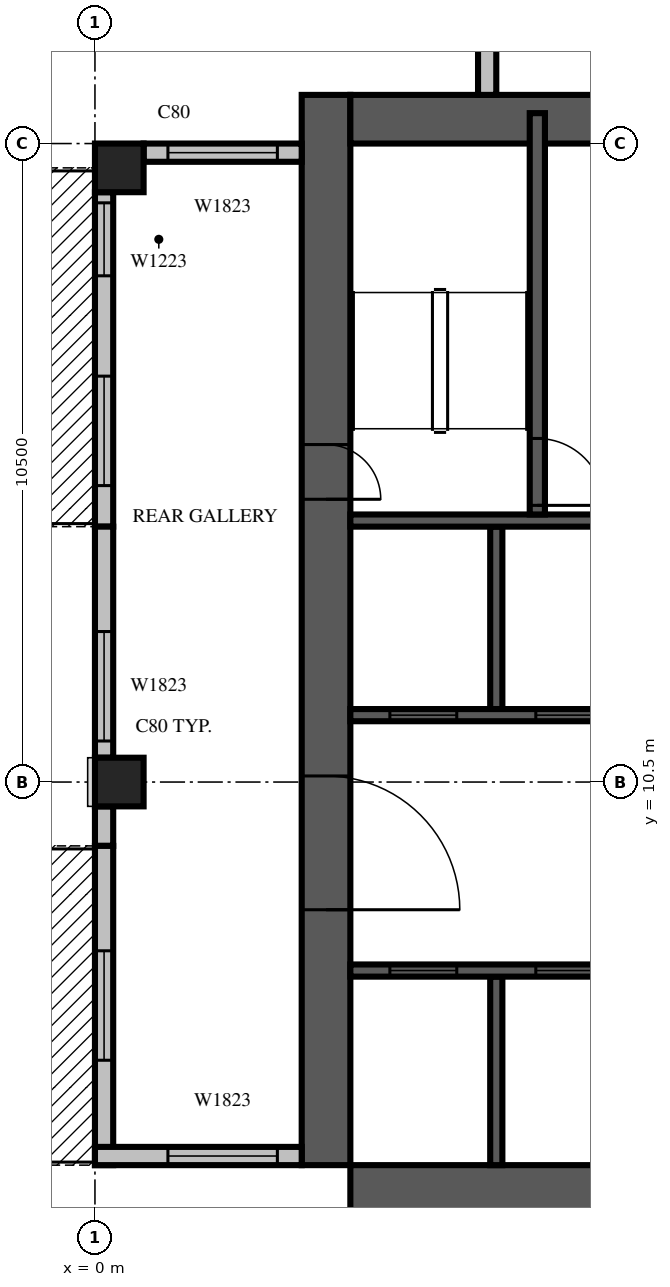
"""IFC4 building model, lengths in metres.
Left out: names, types, materials, properties, quantities, classifications, styles, units other than length and angle.
Written with IfcOpenShell. Run it as: python <this file> out.ifc"""

import sys

from ifc_helpers import new_model, si_unit, direction, frame, frame_2d, origin, origin_2d, place, context, subcontext, project, spatial, rectangle, extrude, source, transform, mapped, element, fill, save


model = new_model("IFC4")
c1 = context("Model", 3, precision=1e-05, world=origin(), true_north=direction((0.0, 1.0)))
c2 = subcontext(c1, "Body", "Model", "MODEL_VIEW")
j1 = project(units=[si_unit("LENGTHUNIT", "METRE"), si_unit("PLANEANGLEUNIT", "RADIAN")], contexts=[c1])
p1 = place(None, origin())
s1 = spatial("IfcSite", under=j1, at=p1, CompositionType="ELEMENT")
p2 = place(p1, origin())
s2 = spatial("IfcBuilding", under=s1, at=p2, CompositionType="ELEMENT")
p3 = place(p2, frame((0.0, 0.0, 261.4)))
s3 = spatial("IfcBuildingStorey", under=s2, at=p3, CompositionType="ELEMENT", Elevation=261.4)
m1 = source(origin(), c2, "Body", "SweptSolid", [
    extrude(rectangle(XDim=0.8, YDim=0.8, at=origin_2d()), origin(), (0.0, 0.0, 1.0), 3.8),
])
for number, where, z_axis, x_axis in (
    (1, (0.4, 10.5, 0.0), (0.0, 0.0, 1.0), (1.0, 0.0, 0.0)),
    (2, (0.4, 20.6, 0.0), (0.0, 0.0, 1.0), (1.0, 0.0, 0.0)),
):
    element("IfcColumn", number, at=place(p3, frame(where, z_axis=z_axis, x_axis=x_axis)), inside=s3, PredefinedType="COLUMN", context=c2, shape_type="MappedRepresentation", body=[
        mapped(m1, transform((0.0, 0.0, 0.0), scale=1.0)),
    ])
m2 = source(origin(), c2, "Body", "SweptSolid", [
    extrude(rectangle(XDim=17.6, YDim=0.8, at=frame_2d((8.8, 0.0))), origin(), (0.0, 0.0, 1.0), 3.8),
])
p4 = place(p3, frame((3.8, 4.2, 0.0), z_axis=(0.0, 0.0, 1.0), x_axis=(0.0, 1.0, 0.0)))
e3 = element("IfcWall", 3, at=p4, inside=s3, PredefinedType="SHEAR", context=c2, shape_type="MappedRepresentation", body=[
    mapped(m2, transform((0.0, 0.0, 0.0), scale=1.0)),
])
m3 = source(origin(), c2, "Body", "SweptSolid", [
    extrude(rectangle(XDim=2.2, YDim=2.1, at=frame_2d((1.1, 1.05))), frame((0.0, 0.41, 0.0), z_axis=(0.0, -1.0, 0.0), x_axis=(1.0, 0.0, 0.0)), (0.0, 0.0, 1.0), 0.82),
])
p5 = place(p4, frame((4.2, 0.0, 0.0)))
e4 = element("IfcOpeningElement", 4, at=p5, cuts=e3, PredefinedType="OPENING", context=c2, shape_type="MappedRepresentation", body=[
    mapped(m3, transform((0.0, 0.0, 0.0), scale=1.0)),
])
m4 = source(origin(), c2, "Body", "SweptSolid", [
    extrude(rectangle(XDim=0.9, YDim=2.1, at=frame_2d((0.45, 1.05))), frame((0.0, 0.41, 0.0), z_axis=(0.0, -1.0, 0.0), x_axis=(1.0, 0.0, 0.0)), (0.0, 0.0, 1.0), 0.82),
])
p6 = place(p4, frame((10.95, 0.0, 0.0)))
e5 = element("IfcOpeningElement", 5, at=p6, cuts=e3, PredefinedType="OPENING", context=c2, shape_type="MappedRepresentation", body=[
    mapped(m4, transform((0.0, 0.0, 0.0), scale=1.0)),
])
p7 = place(p3, frame((4.2, 3.8, 0.0), z_axis=(0.0, 0.0, 1.0), x_axis=(1.0, 0.0, 0.0)))
e6 = element("IfcWall", 6, at=p7, inside=s3, PredefinedType="SHEAR", context=c2, shape_type="MappedRepresentation", body=[
    mapped(m2, transform((0.0, 0.0, 0.0), scale=1.0)),
])
p8 = place(p7, frame((12.75, 0.0, 0.0)))
e7 = element("IfcOpeningElement", 7, at=p8, cuts=e6, PredefinedType="OPENING", context=c2, shape_type="MappedRepresentation", body=[
    mapped(m4, transform((0.0, 0.0, 0.0), scale=1.0)),
])
m5 = source(origin(), c2, "Body", "SweptSolid", [
    extrude(rectangle(XDim=16.8, YDim=0.8, at=frame_2d((8.4, 0.0))), origin(), (0.0, 0.0, 1.0), 3.8),
])
p9 = place(p3, frame((4.2, 21.4, 0.0), z_axis=(0.0, 0.0, 1.0), x_axis=(1.0, 0.0, 0.0)))
e8 = element("IfcWall", 8, at=p9, inside=s3, PredefinedType="SHEAR", context=c2, shape_type="MappedRepresentation", body=[
    mapped(m5, transform((0.0, 0.0, 0.0), scale=1.0)),
])
m6 = source(origin(), c2, "Body", "SweptSolid", [
    extrude(rectangle(XDim=1.2, YDim=2.1, at=frame_2d((0.6, 1.05))), frame((0.0, 0.41, 0.0), z_axis=(0.0, -1.0, 0.0), x_axis=(1.0, 0.0, 0.0)), (0.0, 0.0, 1.0), 0.82),
])
p10 = place(p9, frame((6.2, 0.0, 0.0)))
e9 = element("IfcOpeningElement", 9, at=p10, cuts=e8, PredefinedType="OPENING", context=c2, shape_type="MappedRepresentation", body=[
    mapped(m6, transform((0.0, 0.0, 0.0), scale=1.0)),
])
m7 = source(origin(), c2, "Body", "SweptSolid", [
    extrude(rectangle(XDim=16.6, YDim=0.3, at=frame_2d((8.3, 0.0))), origin(), (0.0, 0.0, 1.0), 3.4),
])
p11 = place(p3, frame((6.45, 38.4, 0.0), z_axis=(0.0, 0.0, 1.0), x_axis=(0.0, -1.0, 0.0)))
e10 = element("IfcWall", 10, at=p11, inside=s3, PredefinedType="STANDARD", context=c2, shape_type="MappedRepresentation", body=[
    mapped(m7, transform((0.0, 0.0, 0.0), scale=1.0)),
])
m8 = source(origin(), c2, "Body", "SweptSolid", [
    extrude(rectangle(XDim=1.8, YDim=2.3, at=frame_2d((0.9, 1.15))), frame((0.0, 0.16, 0.0), z_axis=(0.0, -1.0, 0.0), x_axis=(1.0, 0.0, 0.0)), (0.0, 0.0, 1.0), 0.32),
])
p12 = place(p11, frame((1.15, 0.0, 0.6)))
e11 = element("IfcOpeningElement", 11, at=p12, cuts=e10, PredefinedType="OPENING", context=c2, shape_type="MappedRepresentation", body=[
    mapped(m8, transform((0.0, 0.0, 0.0), scale=1.0)),
])
m9 = source(origin(), c2, "Body", "SweptSolid", [
    extrude(rectangle(XDim=2.4, YDim=2.3, at=frame_2d((1.2, 1.15))), frame((0.0, 0.16, 0.0), z_axis=(0.0, -1.0, 0.0), x_axis=(1.0, 0.0, 0.0)), (0.0, 0.0, 1.0), 0.32),
])
p13 = place(p11, frame((4.75, 0.0, 0.6)))
e12 = element("IfcOpeningElement", 12, at=p13, cuts=e10, PredefinedType="OPENING", context=c2, shape_type="MappedRepresentation", body=[
    mapped(m9, transform((0.0, 0.0, 0.0), scale=1.0)),
])
p14 = place(p11, frame((9.438, 0.0, 0.6)))
e13 = element("IfcOpeningElement", 13, at=p14, cuts=e10, PredefinedType="OPENING", context=c2, shape_type="MappedRepresentation", body=[
    mapped(m8, transform((0.0, 0.0, 0.0), scale=1.0)),
])
m10 = source(origin(), c2, "Body", "SweptSolid", [
    extrude(rectangle(XDim=3.0, YDim=2.3, at=frame_2d((1.5, 1.15))), frame((0.0, 0.16, 0.0), z_axis=(0.0, -1.0, 0.0), x_axis=(1.0, 0.0, 0.0)), (0.0, 0.0, 1.0), 0.32),
])
p15 = place(p11, frame((12.7, 0.0, 0.6)))
e14 = element("IfcOpeningElement", 14, at=p15, cuts=e10, PredefinedType="OPENING", context=c2, shape_type="MappedRepresentation", body=[
    mapped(m10, transform((0.0, 0.0, 0.0), scale=1.0)),
])
m11 = source(origin(), c2, "Body", "SweptSolid", [
    extrude(rectangle(XDim=2.6, YDim=0.3, at=frame_2d((1.3, 0.0))), origin(), (0.0, 0.0, 1.0), 3.4),
])
p16 = place(p3, frame((3.4, 20.85, 0.0), z_axis=(0.0, 0.0, 1.0), x_axis=(-1.0, 0.0, 0.0)))
e15 = element("IfcWall", 15, at=p16, inside=s3, PredefinedType="STANDARD", context=c2, shape_type="MappedRepresentation", body=[
    mapped(m11, transform((0.0, 0.0, 0.0), scale=1.0)),
])
p17 = place(p16, frame((0.4, 0.0, 0.6)))
e16 = element("IfcOpeningElement", 16, at=p17, cuts=e15, PredefinedType="OPENING", context=c2, shape_type="MappedRepresentation", body=[
    mapped(m8, transform((0.0, 0.0, 0.0), scale=1.0)),
])
m12 = source(origin(), c2, "Body", "SweptSolid", [
    extrude(rectangle(XDim=5.5, YDim=0.3, at=frame_2d((2.75, 0.0))), origin(), (0.0, 0.0, 1.0), 3.4),
])
p18 = place(p3, frame((0.15, 20.2, 0.0), z_axis=(0.0, 0.0, 1.0), x_axis=(0.0, -1.0, 0.0)))
e17 = element("IfcWall", 17, at=p18, inside=s3, PredefinedType="STANDARD", context=c2, shape_type="MappedRepresentation", body=[
    mapped(m12, transform((0.0, 0.0, 0.0), scale=1.0)),
])
m13 = source(origin(), c2, "Body", "SweptSolid", [
    extrude(rectangle(XDim=1.8, YDim=2.4, at=frame_2d((0.9, 1.2))), frame((0.0, 0.16, 0.0), z_axis=(0.0, -1.0, 0.0), x_axis=(1.0, 0.0, 0.0)), (0.0, 0.0, 1.0), 0.32),
])
p19 = place(p18, frame((3.025, 0.0, 0.0)))
e18 = element("IfcOpeningElement", 18, at=p19, cuts=e17, PredefinedType="OPENING", context=c2, shape_type="MappedRepresentation", body=[
    mapped(m13, transform((0.0, 0.0, 0.0), scale=1.0)),
])
m14 = source(origin(), c2, "Body", "SweptSolid", [
    extrude(rectangle(XDim=1.2, YDim=2.3, at=frame_2d((0.6, 1.15))), frame((0.0, 0.16, 0.0), z_axis=(0.0, -1.0, 0.0), x_axis=(1.0, 0.0, 0.0)), (0.0, 0.0, 1.0), 0.32),
])
p20 = place(p18, frame((0.175, 0.0, 0.6)))
e19 = element("IfcOpeningElement", 19, at=p20, cuts=e17, PredefinedType="OPENING", context=c2, shape_type="MappedRepresentation", body=[
    mapped(m14, transform((0.0, 0.0, 0.0), scale=1.0)),
])
m15 = source(origin(), c2, "Body", "SweptSolid", [
    extrude(rectangle(XDim=3.8, YDim=0.3, at=frame_2d((1.9, 0.0))), origin(), (0.0, 0.0, 1.0), 3.4),
])
p21 = place(p3, frame((0.15, 14.7, 0.0), z_axis=(0.0, 0.0, 1.0), x_axis=(0.0, -1.0, 0.0)))
e20 = element("IfcWall", 20, at=p21, inside=s3, PredefinedType="STANDARD", context=c2, shape_type="MappedRepresentation", body=[
    mapped(m15, transform((0.0, 0.0, 0.0), scale=1.0)),
])
p22 = place(p21, frame((1.725, 0.0, 0.6)))
e21 = element("IfcOpeningElement", 21, at=p22, cuts=e20, PredefinedType="OPENING", context=c2, shape_type="MappedRepresentation", body=[
    mapped(m8, transform((0.0, 0.0, 0.0), scale=1.0)),
])
m16 = source(origin(), c2, "Body", "SweptSolid", [
    extrude(rectangle(XDim=0.65, YDim=0.3, at=frame_2d((0.325, 0.0))), origin(), (0.0, 0.0, 1.0), 3.4),
])
p23 = place(p3, frame((0.15, 10.1, 0.0), z_axis=(0.0, 0.0, 1.0), x_axis=(0.0, -1.0, 0.0)))
e22 = element("IfcWall", 22, at=p23, inside=s3, PredefinedType="STANDARD", context=c2, shape_type="MappedRepresentation", body=[
    mapped(m16, transform((0.0, 0.0, 0.0), scale=1.0)),
])
m17 = source(origin(), c2, "Body", "SweptSolid", [
    extrude(rectangle(XDim=5.25, YDim=0.3, at=frame_2d((2.625, 0.0))), origin(), (0.0, 0.0, 1.0), 3.4),
])
p24 = place(p3, frame((0.15, 9.45, 0.0), z_axis=(0.0, 0.0, 1.0), x_axis=(0.0, -1.0, 0.0)))
e23 = element("IfcWall", 23, at=p24, inside=s3, PredefinedType="STANDARD", context=c2, shape_type="MappedRepresentation", body=[
    mapped(m17, transform((0.0, 0.0, 0.0), scale=1.0)),
])
p25 = place(p24, frame((1.725, 0.0, 0.0)))
e24 = element("IfcOpeningElement", 24, at=p25, cuts=e23, PredefinedType="OPENING", context=c2, shape_type="MappedRepresentation", body=[
    mapped(m13, transform((0.0, 0.0, 0.0), scale=1.0)),
])
m18 = source(origin(), c2, "Body", "SweptSolid", [
    extrude(rectangle(XDim=3.4, YDim=0.3, at=frame_2d((1.7, 0.0))), origin(), (0.0, 0.0, 1.0), 3.4),
])
p26 = place(p3, frame((0.0, 4.35, 0.0), z_axis=(0.0, 0.0, 1.0), x_axis=(1.0, 0.0, 0.0)))
e25 = element("IfcWall", 25, at=p26, inside=s3, PredefinedType="STANDARD", context=c2, shape_type="MappedRepresentation", body=[
    mapped(m18, transform((0.0, 0.0, 0.0), scale=1.0)),
])
p27 = place(p26, frame((1.2, 0.0, 0.6)))
e26 = element("IfcOpeningElement", 26, at=p27, cuts=e25, PredefinedType="OPENING", context=c2, shape_type="MappedRepresentation", body=[
    mapped(m8, transform((0.0, 0.0, 0.0), scale=1.0)),
])
m19 = source(origin(), c2, "Body", "SweptSolid", [
    extrude(rectangle(XDim=3.1, YDim=0.2, at=frame_2d((1.55, 0.0))), origin(), (0.0, 0.0, 1.0), 3.8),
])
p28 = place(p3, frame((6.6, 4.2, 0.0), z_axis=(0.0, 0.0, 1.0), x_axis=(0.0, 1.0, 0.0)))
e27 = element("IfcWall", 27, at=p28, inside=s3, PredefinedType="SOLIDWALL", context=c2, shape_type="MappedRepresentation", body=[
    mapped(m19, transform((0.0, 0.0, 0.0), scale=1.0)),
])
m20 = source(origin(), c2, "Body", "SweptSolid", [
    extrude(rectangle(XDim=3.0, YDim=0.2, at=frame_2d((1.5, 0.0))), origin(), (0.0, 0.0, 1.0), 3.8),
])
p29 = place(p3, frame((6.6, 11.7, 0.0), z_axis=(0.0, 0.0, 1.0), x_axis=(0.0, 1.0, 0.0)))
e28 = element("IfcWall", 28, at=p29, inside=s3, PredefinedType="SOLIDWALL", context=c2, shape_type="MappedRepresentation", body=[
    mapped(m20, transform((0.0, 0.0, 0.0), scale=1.0)),
])
m21 = source(origin(), c2, "Body", "SweptSolid", [
    extrude(rectangle(XDim=9.6, YDim=0.2, at=frame_2d((4.8, 0.0))), origin(), (0.0, 0.0, 1.0), 3.8),
])
p30 = place(p3, frame((4.2, 7.4, 0.0), z_axis=(0.0, 0.0, 1.0), x_axis=(1.0, 0.0, 0.0)))
e29 = element("IfcWall", 29, at=p30, inside=s3, PredefinedType="SOLIDWALL", context=c2, shape_type="MappedRepresentation", body=[
    mapped(m21, transform((0.0, 0.0, 0.0), scale=1.0)),
])
m22 = source(origin(), c2, "Body", "SweptSolid", [
    extrude(rectangle(XDim=1.1, YDim=2.1, at=frame_2d((0.55, 1.05))), frame((0.0, 0.11, 0.0), z_axis=(0.0, -1.0, 0.0), x_axis=(1.0, 0.0, 0.0)), (0.0, 0.0, 1.0), 0.22),
])
p31 = place(p30, frame((0.65, 0.0, 0.0)))
e30 = element("IfcOpeningElement", 30, at=p31, cuts=e29, PredefinedType="OPENING", context=c2, shape_type="MappedRepresentation", body=[
    mapped(m22, transform((0.0, 0.0, 0.0), scale=1.0)),
])
p32 = place(p30, frame((3.05, 0.0, 0.0)))
e31 = element("IfcOpeningElement", 31, at=p32, cuts=e29, PredefinedType="OPENING", context=c2, shape_type="MappedRepresentation", body=[
    mapped(m22, transform((0.0, 0.0, 0.0), scale=1.0)),
])
p33 = place(p30, frame((5.45, 0.0, 0.0)))
e32 = element("IfcOpeningElement", 32, at=p33, cuts=e29, PredefinedType="OPENING", context=c2, shape_type="MappedRepresentation", body=[
    mapped(m22, transform((0.0, 0.0, 0.0), scale=1.0)),
])
p34 = place(p30, frame((7.85, 0.0, 0.0)))
e33 = element("IfcOpeningElement", 33, at=p34, cuts=e29, PredefinedType="OPENING", context=c2, shape_type="MappedRepresentation", body=[
    mapped(m22, transform((0.0, 0.0, 0.0), scale=1.0)),
])
m23 = source(origin(), c2, "Body", "SweptSolid", [
    extrude(rectangle(XDim=4.8, YDim=0.2, at=frame_2d((2.4, 0.0))), origin(), (0.0, 0.0, 1.0), 3.8),
])
p35 = place(p3, frame((4.2, 11.6, 0.0), z_axis=(0.0, 0.0, 1.0), x_axis=(1.0, 0.0, 0.0)))
e34 = element("IfcWall", 34, at=p35, inside=s3, PredefinedType="SOLIDWALL", context=c2, shape_type="MappedRepresentation", body=[
    mapped(m23, transform((0.0, 0.0, 0.0), scale=1.0)),
])
p36 = place(p35, frame((0.65, 0.0, 0.0)))
e35 = element("IfcOpeningElement", 35, at=p36, cuts=e34, PredefinedType="OPENING", context=c2, shape_type="MappedRepresentation", body=[
    mapped(m22, transform((0.0, 0.0, 0.0), scale=1.0)),
])
p37 = place(p35, frame((3.05, 0.0, 0.0)))
e36 = element("IfcOpeningElement", 36, at=p37, cuts=e34, PredefinedType="OPENING", context=c2, shape_type="MappedRepresentation", body=[
    mapped(m22, transform((0.0, 0.0, 0.0), scale=1.0)),
])
p38 = place(p3, frame((4.2, 14.8, 0.0), z_axis=(0.0, 0.0, 1.0), x_axis=(1.0, 0.0, 0.0)))
e37 = element("IfcWall", 37, at=p38, inside=s3, PredefinedType="SOLIDWALL", context=c2, shape_type="MappedRepresentation", body=[
    mapped(m23, transform((0.0, 0.0, 0.0), scale=1.0)),
])
m24 = source(origin(), c2, "Body", "SweptSolid", [
    extrude(rectangle(XDim=6.6, YDim=0.25, at=frame_2d((3.3, 0.0))), origin(), (0.0, 0.0, 1.0), 3.4),
])
p39 = place(p3, frame((7.275, 14.9, 0.0), z_axis=(0.0, 0.0, 1.0), x_axis=(0.0, 1.0, 0.0)))
e38 = element("IfcWall", 38, at=p39, inside=s3, PredefinedType="SOLIDWALL", context=c2, shape_type="MappedRepresentation", body=[
    mapped(m24, transform((0.0, 0.0, 0.0), scale=1.0)),
])
m25 = source(origin(), c2, "Body", "SweptSolid", [
    extrude(rectangle(XDim=1.1, YDim=2.1, at=frame_2d((0.55, 1.05))), frame((0.0, 0.135, 0.0), z_axis=(0.0, -1.0, 0.0), x_axis=(1.0, 0.0, 0.0)), (0.0, 0.0, 1.0), 0.27),
])
p40 = place(p39, frame((0.15, 0.0, 0.0)))
e39 = element("IfcOpeningElement", 39, at=p40, cuts=e38, PredefinedType="OPENING", context=c2, shape_type="MappedRepresentation", body=[
    mapped(m25, transform((0.0, 0.0, 0.0), scale=1.0)),
])
m26 = source(origin(), c2, "Body", "SweptSolid", [
    extrude(rectangle(XDim=1.8, YDim=2.3, at=frame_2d((0.9, 1.15))), frame((0.0, 0.03, 0.0), z_axis=(0.0, -1.0, 0.0), x_axis=(1.0, 0.0, 0.0)), (0.0, 0.0, 1.0), 0.06),
])
p41 = place(p17, origin())
e40 = element("IfcWindow", 40, at=p41, inside=s3, PartitioningType="SINGLE_PANEL", PredefinedType="WINDOW", context=c2, shape_type="MappedRepresentation", body=[
    mapped(m26, transform((0.0, 0.0, 0.0), scale=1.0)),
])
fill(e16, e40)
m27 = source(origin(), c2, "Body", "SweptSolid", [
    extrude(rectangle(XDim=1.8, YDim=2.4, at=frame_2d((0.9, 1.2))), frame((0.0, 0.025, 0.0), z_axis=(0.0, -1.0, 0.0), x_axis=(1.0, 0.0, 0.0)), (0.0, 0.0, 1.0), 0.05),
])
p42 = place(p19, origin())
e41 = element("IfcDoor", 41, at=p42, inside=s3, OperationType="SLIDING_TO_LEFT", PredefinedType="DOOR", context=c2, shape_type="MappedRepresentation", body=[
    mapped(m27, transform((0.0, 0.0, 0.0), scale=1.0)),
])
fill(e18, e41)
m28 = source(origin(), c2, "Body", "SweptSolid", [
    extrude(rectangle(XDim=1.2, YDim=2.3, at=frame_2d((0.6, 1.15))), frame((0.0, 0.03, 0.0), z_axis=(0.0, -1.0, 0.0), x_axis=(1.0, 0.0, 0.0)), (0.0, 0.0, 1.0), 0.06),
])
p43 = place(p20, origin())
e42 = element("IfcWindow", 42, at=p43, inside=s3, PartitioningType="SINGLE_PANEL", PredefinedType="WINDOW", context=c2, shape_type="MappedRepresentation", body=[
    mapped(m28, transform((0.0, 0.0, 0.0), scale=1.0)),
])
fill(e19, e42)
p44 = place(p22, origin())
e43 = element("IfcWindow", 43, at=p44, inside=s3, PartitioningType="SINGLE_PANEL", PredefinedType="WINDOW", context=c2, shape_type="MappedRepresentation", body=[
    mapped(m26, transform((0.0, 0.0, 0.0), scale=1.0)),
])
fill(e21, e43)
p45 = place(p25, origin())
e44 = element("IfcDoor", 44, at=p45, inside=s3, OperationType="SLIDING_TO_LEFT", PredefinedType="DOOR", context=c2, shape_type="MappedRepresentation", body=[
    mapped(m27, transform((0.0, 0.0, 0.0), scale=1.0)),
])
fill(e24, e44)
p46 = place(p27, origin())
e45 = element("IfcWindow", 45, at=p46, inside=s3, PartitioningType="SINGLE_PANEL", PredefinedType="WINDOW", context=c2, shape_type="MappedRepresentation", body=[
    mapped(m26, transform((0.0, 0.0, 0.0), scale=1.0)),
])
fill(e26, e45)
m29 = source(origin(), c2, "Body", "SweptSolid", [
    extrude(rectangle(XDim=1.1, YDim=2.1, at=frame_2d((0.55, 1.05))), frame((0.0, 0.025, 0.0), z_axis=(0.0, -1.0, 0.0), x_axis=(1.0, 0.0, 0.0)), (0.0, 0.0, 1.0), 0.05),
])
p47 = place(p31, origin())
e46 = element("IfcDoor", 46, at=p47, inside=s3, OperationType="SLIDING_TO_LEFT", PredefinedType="DOOR", context=c2, shape_type="MappedRepresentation", body=[
    mapped(m29, transform((0.0, 0.0, 0.0), scale=1.0)),
])
fill(e30, e46)
p48 = place(p32, origin())
e47 = element("IfcDoor", 47, at=p48, inside=s3, OperationType="SLIDING_TO_LEFT", PredefinedType="DOOR", context=c2, shape_type="MappedRepresentation", body=[
    mapped(m29, transform((0.0, 0.0, 0.0), scale=1.0)),
])
fill(e31, e47)
p49 = place(p36, origin())
e48 = element("IfcDoor", 48, at=p49, inside=s3, OperationType="SLIDING_TO_LEFT", PredefinedType="DOOR", context=c2, shape_type="MappedRepresentation", body=[
    mapped(m29, transform((0.0, 0.0, 0.0), scale=1.0)),
])
fill(e35, e48)
p50 = place(p37, origin())
e49 = element("IfcDoor", 49, at=p50, inside=s3, OperationType="SLIDING_TO_LEFT", PredefinedType="DOOR", context=c2, shape_type="MappedRepresentation", body=[
    mapped(m29, transform((0.0, 0.0, 0.0), scale=1.0)),
])
fill(e36, e49)
p51 = place(p40, origin())
e50 = element("IfcDoor", 50, at=p51, inside=s3, OperationType="SINGLE_SWING_RIGHT", PredefinedType="DOOR", context=c2, shape_type="MappedRepresentation", body=[
    mapped(m29, transform((0.0, 0.0, 0.0), scale=1.0)),
])
fill(e39, e50)
m30 = source(origin(), c2, "Body", "SweptSolid", [
    extrude(rectangle(XDim=2.2, YDim=2.1, at=frame_2d((1.1, 1.05))), frame((0.0, 0.025, 0.0), z_axis=(0.0, -1.0, 0.0), x_axis=(1.0, 0.0, 0.0)), (0.0, 0.0, 1.0), 0.05),
])
p52 = place(p5, origin())
e51 = element("IfcDoor", 51, at=p52, inside=s3, OperationType="DOUBLE_DOOR_SINGLE_SWING", PredefinedType="DOOR", context=c2, shape_type="MappedRepresentation", body=[
    mapped(m30, transform((0.0, 0.0, 0.0), scale=1.0)),
])
fill(e4, e51)
m31 = source(origin(), c2, "Body", "SweptSolid", [
    extrude(rectangle(XDim=0.9, YDim=2.1, at=frame_2d((0.45, 1.05))), frame((0.0, 0.025, 0.0), z_axis=(0.0, -1.0, 0.0), x_axis=(1.0, 0.0, 0.0)), (0.0, 0.0, 1.0), 0.05),
])
p53 = place(p6, origin())
e52 = element("IfcDoor", 52, at=p53, inside=s3, OperationType="SINGLE_SWING_RIGHT", PredefinedType="DOOR", context=c2, shape_type="MappedRepresentation", body=[
    mapped(m31, transform((0.0, 0.0, 0.0), scale=1.0)),
])
fill(e5, e52)
save(model, sys.argv[1])
